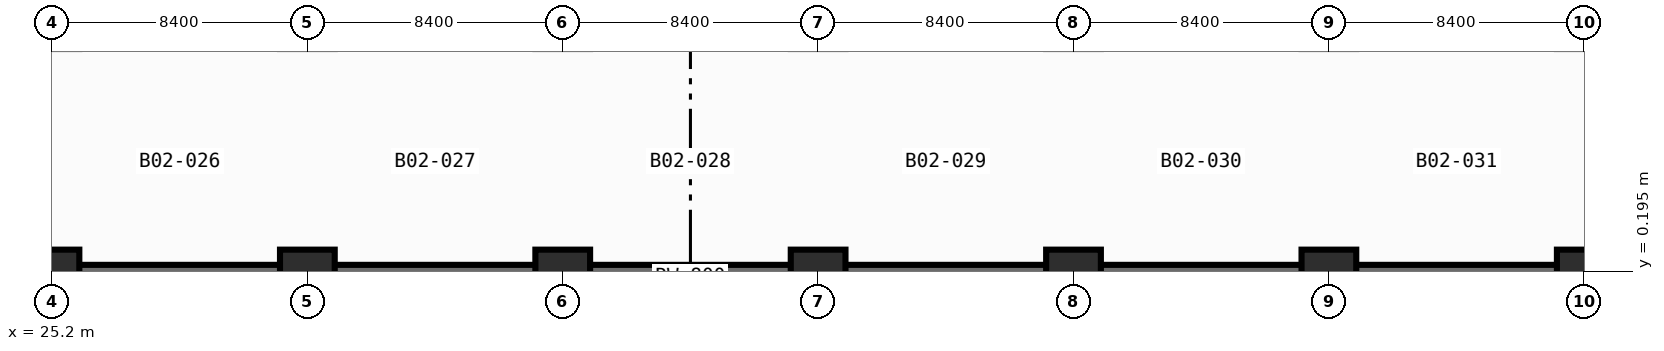
"""IFC4 building model, lengths in metres.
Left out: names, types, materials, properties, quantities, classifications, styles, units other than length and angle.
Written with IfcOpenShell. Run it as: python <this file> out.ifc"""

import sys

from ifc_helpers import new_model, si_unit, direction, frame, frame_2d, origin, origin_2d, place, context, subcontext, project, spatial, rectangle, extrude, element, save


model = new_model("IFC4")
c1 = context("Model", 3, precision=1e-05, world=origin(), true_north=direction((0.0, 1.0)))
c2 = subcontext(c1, "Body", "Model", "MODEL_VIEW")
j1 = project(units=[si_unit("LENGTHUNIT", "METRE"), si_unit("PLANEANGLEUNIT", "RADIAN")], contexts=[c1])
p1 = place(None, origin())
s1 = spatial("IfcSite", under=j1, at=p1, CompositionType="ELEMENT")
p2 = place(p1, origin())
s2 = spatial("IfcBuilding", under=s1, at=p2, CompositionType="ELEMENT")
p3 = place(p2, frame((0.0, 0.0, -8.4)))
s3 = spatial("IfcBuildingStorey", under=s2, at=p3, CompositionType="ELEMENT", Elevation=-8.4)
p4 = place(p3, frame((-0.4, 0.0, 0.0), z_axis=(0.0, 0.0, 1.0), x_axis=(1.0, 0.0, 0.0)))
e1 = element("IfcWall", 1, at=p4, inside=s3, PredefinedType="USERDEFINED", context=c2, shape_type="SweptSolid", body=[
    extrude(rectangle(XDim=93.2, YDim=0.8, at=frame_2d((46.6, 0.0))), origin(), (0.0, 0.0, 1.0), 3.85),
])
for number, where, z_axis, x_axis in (
    (2, (25.2, 0.0, 0.0), (0.0, 0.0, 1.0), (1.0, 0.0, 0.0)),
    (3, (33.6, 0.0, 0.0), (0.0, 0.0, 1.0), (1.0, 0.0, 0.0)),
    (4, (42.0, 0.0, 0.0), (0.0, 0.0, 1.0), (1.0, 0.0, 0.0)),
    (5, (50.4, 0.0, 0.0), (0.0, 0.0, 1.0), (1.0, 0.0, 0.0)),
    (6, (58.8, 0.0, 0.0), (0.0, 0.0, 1.0), (1.0, 0.0, 0.0)),
    (7, (67.2, 0.0, 0.0), (0.0, 0.0, 1.0), (1.0, 0.0, 0.0)),
    (8, (75.6, 0.0, 0.0), (0.0, 0.0, 1.0), (1.0, 0.0, 0.0)),
):
    element("IfcColumn", number, at=place(p3, frame(where, z_axis=z_axis, x_axis=x_axis)), inside=s3, PredefinedType="COLUMN", context=c2, shape_type="SweptSolid", body=[
        extrude(rectangle(XDim=1.8, YDim=1.8, at=origin_2d()), origin(), (0.0, 0.0, 1.0), 4.2),
    ])
save(model, sys.argv[1])
